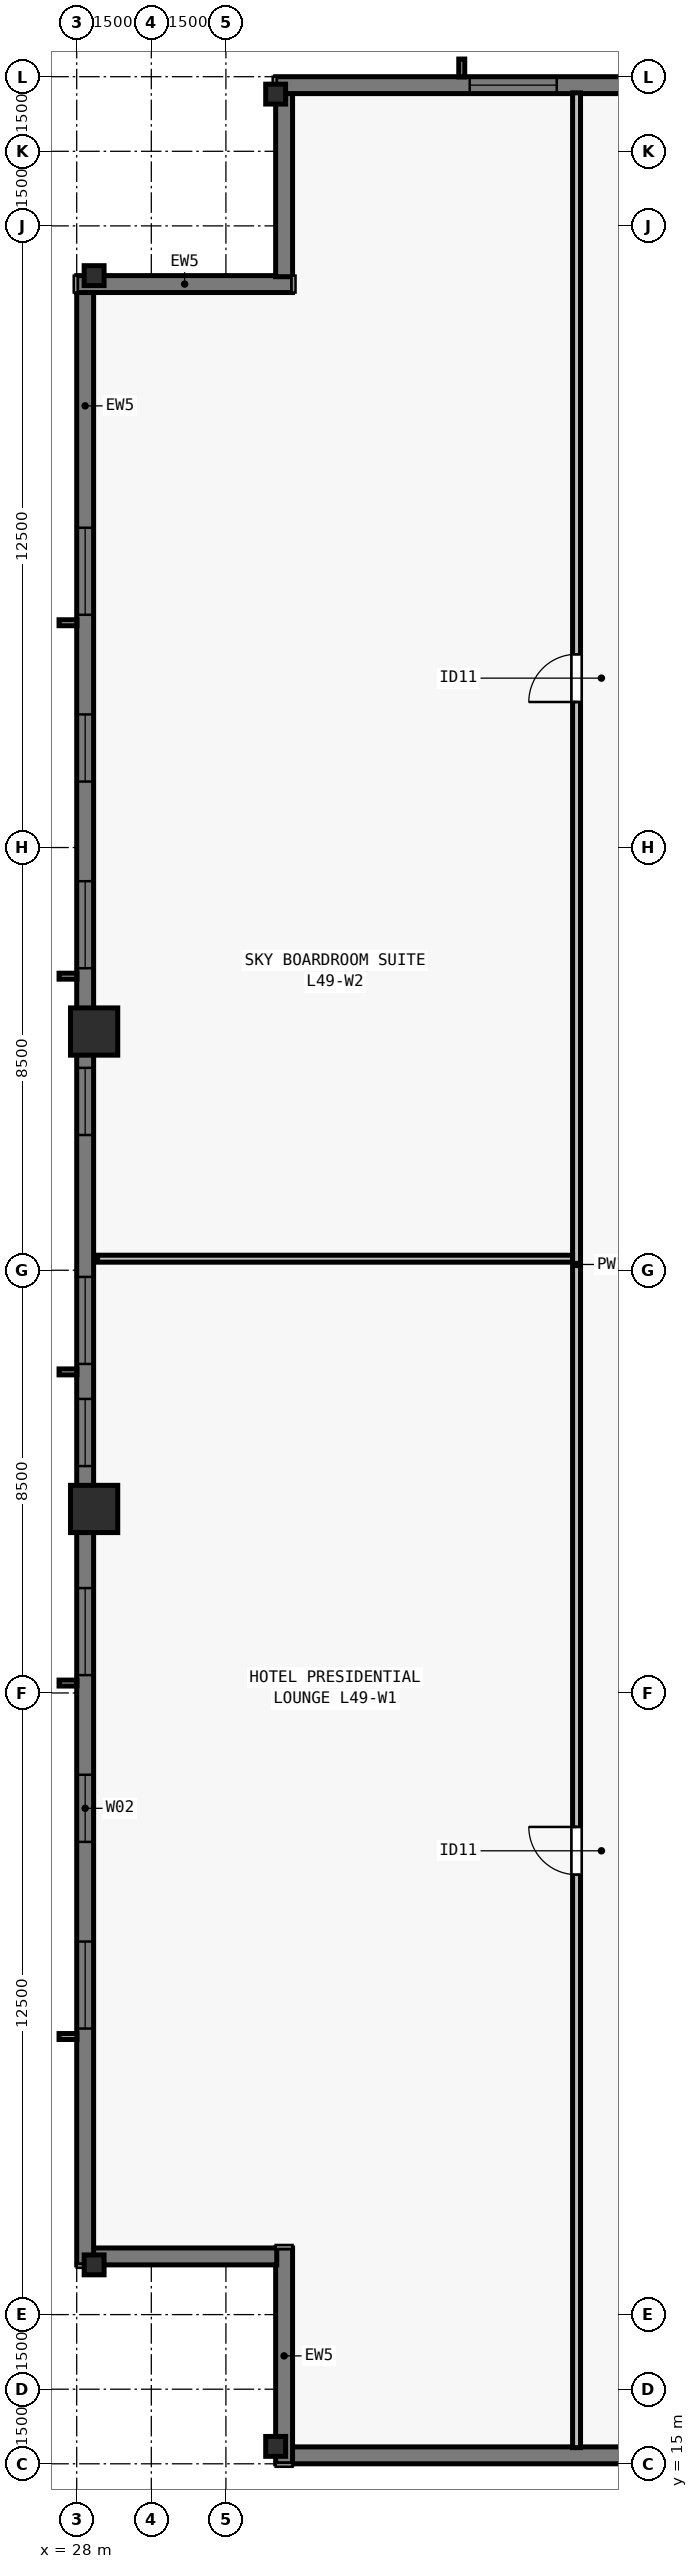
"""IFC4 building model, lengths in metres.
Left out: names, types, materials, properties, quantities, classifications, styles, units other than length and angle.
Written with IfcOpenShell. Run it as: python <this file> out.ifc"""

import sys

from ifc_helpers import new_model, si_unit, direction, frame, frame_2d, origin, origin_2d, place, context, subcontext, project, spatial, rectangle, i_section, extrude, element, fill, save


model = new_model("IFC4")
c1 = context("Model", 3, precision=1e-05, world=origin(), true_north=direction((0.0, 1.0)))
c2 = subcontext(c1, "Body", "Model", "MODEL_VIEW")
j1 = project(units=[si_unit("LENGTHUNIT", "METRE"), si_unit("PLANEANGLEUNIT", "RADIAN")], contexts=[c1])
p1 = place(None, origin())
s1 = spatial("IfcSite", under=j1, at=p1, CompositionType="ELEMENT")
p2 = place(p1, origin())
s2 = spatial("IfcBuilding", under=s1, at=p2, CompositionType="ELEMENT")
p3 = place(p2, frame((0.0, 0.0, 179.5)))
s3 = spatial("IfcBuildingStorey", under=s2, at=p3, CompositionType="ELEMENT", Elevation=179.5)
for number, where, z_axis, x_axis in (
    (1, (32.0, 15.35, 0.0), (0.0, 0.0, 1.0), (1.0, 0.0, 0.0)),
    (2, (32.0, 62.65, 0.0), (0.0, 0.0, 1.0), (1.0, 0.0, 0.0)),
    (3, (28.35, 59.0, 0.0), (0.0, 0.0, 1.0), (0.0, 1.0, 0.0)),
):
    element("IfcColumn", number, at=place(p3, frame(where, z_axis=z_axis, x_axis=x_axis)), inside=s3, PredefinedType="COLUMN", context=c2, shape_type="SweptSolid", body=[
        extrude(i_section(OverallWidth=0.4, OverallDepth=0.4, WebThickness=0.022, FlangeThickness=0.036, at=origin_2d()), origin(), (0.0, 0.0, 1.0), 3.5),
    ])
for number, where, z_axis, x_axis in (
    (4, (28.35, 43.8, 0.0), (0.0, 0.0, 1.0), (0.0, 1.0, 0.0)),
    (5, (28.35, 34.2, 0.0), (0.0, 0.0, 1.0), (0.0, 1.0, 0.0)),
):
    element("IfcColumn", number, at=place(p3, frame(where, z_axis=z_axis, x_axis=x_axis)), inside=s3, PredefinedType="COLUMN", context=c2, shape_type="SweptSolid", body=[
        extrude(rectangle(XDim=0.95, YDim=0.95, at=origin_2d()), origin(), (0.0, 0.0, 1.0), 3.5),
    ])
p4 = place(p3, frame((28.35, 19.0, 0.0), z_axis=(0.0, 0.0, 1.0), x_axis=(0.0, 1.0, 0.0)))
e6 = element("IfcColumn", 6, at=p4, inside=s3, PredefinedType="COLUMN", context=c2, shape_type="SweptSolid", body=[
    extrude(i_section(OverallWidth=0.4, OverallDepth=0.4, WebThickness=0.022, FlangeThickness=0.036, at=origin_2d()), origin(), (0.0, 0.0, 1.0), 3.5),
])
p5 = place(p3, frame((72.0, 15.17, 0.0), z_axis=(0.0, 0.0, 1.0), x_axis=(-1.0, 0.0, 0.0)))
e7 = element("IfcWall", 7, at=p5, inside=s3, PredefinedType="SOLIDWALL", context=c2, shape_type="SweptSolid", body=[
    extrude(rectangle(XDim=39.682, YDim=0.34, at=frame_2d((19.841, 0.0))), origin(), (0.0, 0.0, 1.0), 3.28),
])
p6 = place(p5, frame((11.859, 0.0, 0.8)))
e8 = element("IfcOpeningElement", 8, at=p6, cuts=e7, PredefinedType="OPENING", context=c2, shape_type="SweptSolid", body=[
    extrude(rectangle(XDim=1.75, YDim=1.66, at=frame_2d((0.875, 0.83))), frame((0.0, 0.18, 0.0), z_axis=(0.0, -1.0, 0.0), x_axis=(1.0, 0.0, 0.0)), (0.0, 0.0, 1.0), 0.36),
])
p7 = place(p5, frame((18.966, 0.0, 0.8)))
e9 = element("IfcOpeningElement", 9, at=p7, cuts=e7, PredefinedType="OPENING", context=c2, shape_type="SweptSolid", body=[
    extrude(rectangle(XDim=1.75, YDim=1.66, at=frame_2d((0.875, 0.83))), frame((0.0, 0.18, 0.0), z_axis=(0.0, -1.0, 0.0), x_axis=(1.0, 0.0, 0.0)), (0.0, 0.0, 1.0), 0.36),
])
p8 = place(p5, frame((22.27, 0.0, 0.8)))
e10 = element("IfcOpeningElement", 10, at=p8, cuts=e7, PredefinedType="OPENING", context=c2, shape_type="SweptSolid", body=[
    extrude(rectangle(XDim=1.35, YDim=1.66, at=frame_2d((0.675, 0.83))), frame((0.0, 0.18, 0.0), z_axis=(0.0, -1.0, 0.0), x_axis=(1.0, 0.0, 0.0)), (0.0, 0.0, 1.0), 0.36),
])
p9 = place(p5, frame((26.073, 0.0, 0.8)))
e11 = element("IfcOpeningElement", 11, at=p9, cuts=e7, PredefinedType="OPENING", context=c2, shape_type="SweptSolid", body=[
    extrude(rectangle(XDim=1.75, YDim=1.66, at=frame_2d((0.875, 0.83))), frame((0.0, 0.18, 0.0), z_axis=(0.0, -1.0, 0.0), x_axis=(1.0, 0.0, 0.0)), (0.0, 0.0, 1.0), 0.36),
])
p10 = place(p5, frame((29.827, 0.0, 0.8)))
e12 = element("IfcOpeningElement", 12, at=p10, cuts=e7, PredefinedType="OPENING", context=c2, shape_type="SweptSolid", body=[
    extrude(rectangle(XDim=1.35, YDim=1.66, at=frame_2d((0.675, 0.83))), frame((0.0, 0.18, 0.0), z_axis=(0.0, -1.0, 0.0), x_axis=(1.0, 0.0, 0.0)), (0.0, 0.0, 1.0), 0.36),
])
p11 = place(p3, frame((32.17, 15.0, 0.0), z_axis=(0.0, 0.0, 1.0), x_axis=(0.0, 1.0, 0.0)))
e13 = element("IfcWall", 13, at=p11, inside=s3, PredefinedType="SOLIDWALL", context=c2, shape_type="SweptSolid", body=[
    extrude(rectangle(XDim=4.34, YDim=0.34, at=frame_2d((2.17, 0.0))), origin(), (0.0, 0.0, 1.0), 3.28),
])
p12 = place(p3, frame((32.022, 19.17, 0.0), z_axis=(0.0, 0.0, 1.0), x_axis=(-1.0, 0.0, 0.0)))
e14 = element("IfcWall", 14, at=p12, inside=s3, PredefinedType="SOLIDWALL", context=c2, shape_type="SweptSolid", body=[
    extrude(rectangle(XDim=3.704, YDim=0.34, at=frame_2d((1.852, 0.0))), origin(), (0.0, 0.0, 1.0), 3.28),
])
p13 = place(p3, frame((28.17, 19.0, 0.0), z_axis=(0.0, 0.0, 1.0), x_axis=(0.0, 1.0, 0.0)))
e15 = element("IfcWall", 15, at=p13, inside=s3, PredefinedType="SOLIDWALL", context=c2, shape_type="SweptSolid", body=[
    extrude(rectangle(XDim=39.682, YDim=0.34, at=frame_2d((19.841, 0.0))), origin(), (0.0, 0.0, 1.0), 3.28),
])
p14 = place(p13, frame((4.752, 0.0, 0.8)))
e16 = element("IfcOpeningElement", 16, at=p14, cuts=e15, PredefinedType="OPENING", context=c2, shape_type="SweptSolid", body=[
    extrude(rectangle(XDim=1.75, YDim=1.66, at=frame_2d((0.875, 0.83))), frame((0.0, 0.18, 0.0), z_axis=(0.0, -1.0, 0.0), x_axis=(1.0, 0.0, 0.0)), (0.0, 0.0, 1.0), 0.36),
])
p15 = place(p13, frame((8.505, 0.0, 0.8)))
e17 = element("IfcOpeningElement", 17, at=p15, cuts=e15, PredefinedType="OPENING", context=c2, shape_type="SweptSolid", body=[
    extrude(rectangle(XDim=1.35, YDim=1.66, at=frame_2d((0.675, 0.83))), frame((0.0, 0.18, 0.0), z_axis=(0.0, -1.0, 0.0), x_axis=(1.0, 0.0, 0.0)), (0.0, 0.0, 1.0), 0.36),
])
p16 = place(p13, frame((11.859, 0.0, 0.8)))
e18 = element("IfcOpeningElement", 18, at=p16, cuts=e15, PredefinedType="OPENING", context=c2, shape_type="SweptSolid", body=[
    extrude(rectangle(XDim=1.75, YDim=1.66, at=frame_2d((0.875, 0.83))), frame((0.0, 0.18, 0.0), z_axis=(0.0, -1.0, 0.0), x_axis=(1.0, 0.0, 0.0)), (0.0, 0.0, 1.0), 0.36),
])
p17 = place(p13, frame((16.062, 0.0, 0.8)))
e19 = element("IfcOpeningElement", 19, at=p17, cuts=e15, PredefinedType="OPENING", context=c2, shape_type="SweptSolid", body=[
    extrude(rectangle(XDim=1.35, YDim=1.66, at=frame_2d((0.675, 0.83))), frame((0.0, 0.18, 0.0), z_axis=(0.0, -1.0, 0.0), x_axis=(1.0, 0.0, 0.0)), (0.0, 0.0, 1.0), 0.36),
])
p18 = place(p13, frame((18.116, 0.0, 0.8)))
e20 = element("IfcOpeningElement", 20, at=p18, cuts=e15, PredefinedType="OPENING", context=c2, shape_type="SweptSolid", body=[
    extrude(rectangle(XDim=1.75, YDim=1.66, at=frame_2d((0.875, 0.83))), frame((0.0, 0.18, 0.0), z_axis=(0.0, -1.0, 0.0), x_axis=(1.0, 0.0, 0.0)), (0.0, 0.0, 1.0), 0.36),
])
p19 = place(p13, frame((22.719, 0.0, 0.8)))
e21 = element("IfcOpeningElement", 21, at=p19, cuts=e15, PredefinedType="OPENING", context=c2, shape_type="SweptSolid", body=[
    extrude(rectangle(XDim=1.35, YDim=1.66, at=frame_2d((0.675, 0.83))), frame((0.0, 0.18, 0.0), z_axis=(0.0, -1.0, 0.0), x_axis=(1.0, 0.0, 0.0)), (0.0, 0.0, 1.0), 0.36),
])
p20 = place(p13, frame((26.073, 0.0, 0.8)))
e22 = element("IfcOpeningElement", 22, at=p20, cuts=e15, PredefinedType="OPENING", context=c2, shape_type="SweptSolid", body=[
    extrude(rectangle(XDim=1.75, YDim=1.66, at=frame_2d((0.875, 0.83))), frame((0.0, 0.18, 0.0), z_axis=(0.0, -1.0, 0.0), x_axis=(1.0, 0.0, 0.0)), (0.0, 0.0, 1.0), 0.36),
])
p21 = place(p13, frame((29.827, 0.0, 0.8)))
e23 = element("IfcOpeningElement", 23, at=p21, cuts=e15, PredefinedType="OPENING", context=c2, shape_type="SweptSolid", body=[
    extrude(rectangle(XDim=1.35, YDim=1.66, at=frame_2d((0.675, 0.83))), frame((0.0, 0.18, 0.0), z_axis=(0.0, -1.0, 0.0), x_axis=(1.0, 0.0, 0.0)), (0.0, 0.0, 1.0), 0.36),
])
p22 = place(p13, frame((33.18, 0.0, 0.8)))
e24 = element("IfcOpeningElement", 24, at=p22, cuts=e15, PredefinedType="OPENING", context=c2, shape_type="SweptSolid", body=[
    extrude(rectangle(XDim=1.75, YDim=1.66, at=frame_2d((0.875, 0.83))), frame((0.0, 0.18, 0.0), z_axis=(0.0, -1.0, 0.0), x_axis=(1.0, 0.0, 0.0)), (0.0, 0.0, 1.0), 0.36),
])
p23 = place(p3, frame((28.0, 58.83, 0.0), z_axis=(0.0, 0.0, 1.0), x_axis=(1.0, 0.0, 0.0)))
e25 = element("IfcWall", 25, at=p23, inside=s3, PredefinedType="SOLIDWALL", context=c2, shape_type="SweptSolid", body=[
    extrude(rectangle(XDim=4.34, YDim=0.34, at=frame_2d((2.17, 0.0))), origin(), (0.0, 0.0, 1.0), 3.28),
])
p24 = place(p3, frame((32.17, 58.978, 0.0), z_axis=(0.0, 0.0, 1.0), x_axis=(0.0, 1.0, 0.0)))
e26 = element("IfcWall", 26, at=p24, inside=s3, PredefinedType="SOLIDWALL", context=c2, shape_type="SweptSolid", body=[
    extrude(rectangle(XDim=3.704, YDim=0.34, at=frame_2d((1.852, 0.0))), origin(), (0.0, 0.0, 1.0), 3.28),
])
p25 = place(p3, frame((32.0, 62.83, 0.0), z_axis=(0.0, 0.0, 1.0), x_axis=(1.0, 0.0, 0.0)))
e27 = element("IfcWall", 27, at=p25, inside=s3, PredefinedType="SOLIDWALL", context=c2, shape_type="SweptSolid", body=[
    extrude(rectangle(XDim=39.682, YDim=0.34, at=frame_2d((19.841, 0.0))), origin(), (0.0, 0.0, 1.0), 3.28),
])
p26 = place(p25, frame((3.902, 0.0, 0.8)))
e28 = element("IfcOpeningElement", 28, at=p26, cuts=e27, PredefinedType="OPENING", context=c2, shape_type="SweptSolid", body=[
    extrude(rectangle(XDim=1.75, YDim=1.66, at=frame_2d((0.875, 0.83))), frame((0.0, 0.18, 0.0), z_axis=(0.0, -1.0, 0.0), x_axis=(1.0, 0.0, 0.0)), (0.0, 0.0, 1.0), 0.36),
])
p27 = place(p25, frame((8.505, 0.0, 0.8)))
e29 = element("IfcOpeningElement", 29, at=p27, cuts=e27, PredefinedType="OPENING", context=c2, shape_type="SweptSolid", body=[
    extrude(rectangle(XDim=1.35, YDim=1.66, at=frame_2d((0.675, 0.83))), frame((0.0, 0.18, 0.0), z_axis=(0.0, -1.0, 0.0), x_axis=(1.0, 0.0, 0.0)), (0.0, 0.0, 1.0), 0.36),
])
p28 = place(p25, frame((11.859, 0.0, 0.8)))
e30 = element("IfcOpeningElement", 30, at=p28, cuts=e27, PredefinedType="OPENING", context=c2, shape_type="SweptSolid", body=[
    extrude(rectangle(XDim=1.75, YDim=1.66, at=frame_2d((0.875, 0.83))), frame((0.0, 0.18, 0.0), z_axis=(0.0, -1.0, 0.0), x_axis=(1.0, 0.0, 0.0)), (0.0, 0.0, 1.0), 0.36),
])
p29 = place(p25, frame((16.062, 0.0, 0.8)))
e31 = element("IfcOpeningElement", 31, at=p29, cuts=e27, PredefinedType="OPENING", context=c2, shape_type="SweptSolid", body=[
    extrude(rectangle(XDim=1.35, YDim=1.66, at=frame_2d((0.675, 0.83))), frame((0.0, 0.18, 0.0), z_axis=(0.0, -1.0, 0.0), x_axis=(1.0, 0.0, 0.0)), (0.0, 0.0, 1.0), 0.36),
])
p30 = place(p25, frame((17.716, 0.0, 0.8)))
e32 = element("IfcOpeningElement", 32, at=p30, cuts=e27, PredefinedType="OPENING", context=c2, shape_type="SweptSolid", body=[
    extrude(rectangle(XDim=1.75, YDim=1.66, at=frame_2d((0.875, 0.83))), frame((0.0, 0.18, 0.0), z_axis=(0.0, -1.0, 0.0), x_axis=(1.0, 0.0, 0.0)), (0.0, 0.0, 1.0), 0.36),
])
p31 = place(p25, frame((22.719, 0.0, 0.8)))
e33 = element("IfcOpeningElement", 33, at=p31, cuts=e27, PredefinedType="OPENING", context=c2, shape_type="SweptSolid", body=[
    extrude(rectangle(XDim=1.35, YDim=1.66, at=frame_2d((0.675, 0.83))), frame((0.0, 0.18, 0.0), z_axis=(0.0, -1.0, 0.0), x_axis=(1.0, 0.0, 0.0)), (0.0, 0.0, 1.0), 0.36),
])
p32 = place(p25, frame((26.073, 0.0, 0.8)))
e34 = element("IfcOpeningElement", 34, at=p32, cuts=e27, PredefinedType="OPENING", context=c2, shape_type="SweptSolid", body=[
    extrude(rectangle(XDim=1.75, YDim=1.66, at=frame_2d((0.875, 0.83))), frame((0.0, 0.18, 0.0), z_axis=(0.0, -1.0, 0.0), x_axis=(1.0, 0.0, 0.0)), (0.0, 0.0, 1.0), 0.36),
])
p33 = place(p25, frame((30.677, 0.0, 0.8)))
e35 = element("IfcOpeningElement", 35, at=p33, cuts=e27, PredefinedType="OPENING", context=c2, shape_type="SweptSolid", body=[
    extrude(rectangle(XDim=1.35, YDim=1.66, at=frame_2d((0.675, 0.83))), frame((0.0, 0.18, 0.0), z_axis=(0.0, -1.0, 0.0), x_axis=(1.0, 0.0, 0.0)), (0.0, 0.0, 1.0), 0.36),
])
p34 = place(p25, frame((33.18, 0.0, 0.8)))
e36 = element("IfcOpeningElement", 36, at=p34, cuts=e27, PredefinedType="OPENING", context=c2, shape_type="SweptSolid", body=[
    extrude(rectangle(XDim=1.75, YDim=1.66, at=frame_2d((0.875, 0.83))), frame((0.0, 0.18, 0.0), z_axis=(0.0, -1.0, 0.0), x_axis=(1.0, 0.0, 0.0)), (0.0, 0.0, 1.0), 0.36),
])
p35 = place(p3, frame((38.05, 15.325, 0.0), z_axis=(0.0, 0.0, 1.0), x_axis=(0.0, 1.0, 0.0)))
e37 = element("IfcWall", 37, at=p35, inside=s3, PredefinedType="PARTITIONING", context=c2, shape_type="SweptSolid", body=[
    extrude(rectangle(XDim=47.35, YDim=0.16, at=frame_2d((23.675, 0.0))), origin(), (0.0, 0.0, 1.0), 2.555),
])
p36 = place(p35, frame((11.521, 0.0, 0.0)))
e38 = element("IfcOpeningElement", 38, at=p36, cuts=e37, PredefinedType="OPENING", context=c2, shape_type="SweptSolid", body=[
    extrude(rectangle(XDim=0.96, YDim=2.12, at=frame_2d((0.48, 1.06))), frame((0.0, 0.09, 0.0), z_axis=(0.0, -1.0, 0.0), x_axis=(1.0, 0.0, 0.0)), (0.0, 0.0, 1.0), 0.18),
])
p37 = place(p35, frame((35.101, 0.0, 0.0)))
e39 = element("IfcOpeningElement", 39, at=p37, cuts=e37, PredefinedType="OPENING", context=c2, shape_type="SweptSolid", body=[
    extrude(rectangle(XDim=0.96, YDim=2.12, at=frame_2d((0.48, 1.06))), frame((0.0, 0.09, 0.0), z_axis=(0.0, -1.0, 0.0), x_axis=(1.0, 0.0, 0.0)), (0.0, 0.0, 1.0), 0.18),
])
p38 = place(p3, frame((28.42, 39.232, 0.0), z_axis=(0.0, 0.0, 1.0), x_axis=(1.0, 0.0, 0.0)))
e40 = element("IfcWall", 40, at=p38, inside=s3, PredefinedType="PARTITIONING", context=c2, shape_type="SweptSolid", body=[
    extrude(rectangle(XDim=9.55, YDim=0.14, at=frame_2d((4.775, 0.0))), origin(), (0.0, 0.0, 1.0), 2.896),
])
p39 = place(p14, origin())
e41 = element("IfcWindow", 41, at=p39, inside=s3, PartitioningType="SINGLE_PANEL", PredefinedType="WINDOW", context=c2, shape_type="SweptSolid", body=[
    extrude(rectangle(XDim=1.75, YDim=1.66, at=frame_2d((0.875, 0.83))), frame((0.0, -0.05, 0.0), z_axis=(0.0, -1.0, 0.0), x_axis=(1.0, 0.0, 0.0)), (0.0, 0.0, 1.0), 0.06),
])
fill(e16, e41)
p40 = place(p15, origin())
e42 = element("IfcWindow", 42, at=p40, inside=s3, PartitioningType="SINGLE_PANEL", PredefinedType="WINDOW", context=c2, shape_type="SweptSolid", body=[
    extrude(rectangle(XDim=1.35, YDim=1.66, at=frame_2d((0.675, 0.83))), frame((0.0, -0.05, 0.0), z_axis=(0.0, -1.0, 0.0), x_axis=(1.0, 0.0, 0.0)), (0.0, 0.0, 1.0), 0.06),
])
fill(e17, e42)
p41 = place(p16, origin())
e43 = element("IfcWindow", 43, at=p41, inside=s3, PartitioningType="SINGLE_PANEL", PredefinedType="WINDOW", context=c2, shape_type="SweptSolid", body=[
    extrude(rectangle(XDim=1.75, YDim=1.66, at=frame_2d((0.875, 0.83))), frame((0.0, -0.05, 0.0), z_axis=(0.0, -1.0, 0.0), x_axis=(1.0, 0.0, 0.0)), (0.0, 0.0, 1.0), 0.06),
])
fill(e18, e43)
p42 = place(p17, origin())
e44 = element("IfcWindow", 44, at=p42, inside=s3, PartitioningType="SINGLE_PANEL", PredefinedType="WINDOW", context=c2, shape_type="SweptSolid", body=[
    extrude(rectangle(XDim=1.35, YDim=1.66, at=frame_2d((0.675, 0.83))), frame((0.0, -0.05, 0.0), z_axis=(0.0, -1.0, 0.0), x_axis=(1.0, 0.0, 0.0)), (0.0, 0.0, 1.0), 0.06),
])
fill(e19, e44)
p43 = place(p18, origin())
e45 = element("IfcWindow", 45, at=p43, inside=s3, PartitioningType="SINGLE_PANEL", PredefinedType="WINDOW", context=c2, shape_type="SweptSolid", body=[
    extrude(rectangle(XDim=1.75, YDim=1.66, at=frame_2d((0.875, 0.83))), frame((0.0, -0.05, 0.0), z_axis=(0.0, -1.0, 0.0), x_axis=(1.0, 0.0, 0.0)), (0.0, 0.0, 1.0), 0.06),
])
fill(e20, e45)
p44 = place(p19, origin())
e46 = element("IfcWindow", 46, at=p44, inside=s3, PartitioningType="SINGLE_PANEL", PredefinedType="WINDOW", context=c2, shape_type="SweptSolid", body=[
    extrude(rectangle(XDim=1.35, YDim=1.66, at=frame_2d((0.675, 0.83))), frame((0.0, -0.05, 0.0), z_axis=(0.0, -1.0, 0.0), x_axis=(1.0, 0.0, 0.0)), (0.0, 0.0, 1.0), 0.06),
])
fill(e21, e46)
p45 = place(p20, origin())
e47 = element("IfcWindow", 47, at=p45, inside=s3, PartitioningType="SINGLE_PANEL", PredefinedType="WINDOW", context=c2, shape_type="SweptSolid", body=[
    extrude(rectangle(XDim=1.75, YDim=1.66, at=frame_2d((0.875, 0.83))), frame((0.0, -0.05, 0.0), z_axis=(0.0, -1.0, 0.0), x_axis=(1.0, 0.0, 0.0)), (0.0, 0.0, 1.0), 0.06),
])
fill(e22, e47)
p46 = place(p21, origin())
e48 = element("IfcWindow", 48, at=p46, inside=s3, PartitioningType="SINGLE_PANEL", PredefinedType="WINDOW", context=c2, shape_type="SweptSolid", body=[
    extrude(rectangle(XDim=1.35, YDim=1.66, at=frame_2d((0.675, 0.83))), frame((0.0, -0.05, 0.0), z_axis=(0.0, -1.0, 0.0), x_axis=(1.0, 0.0, 0.0)), (0.0, 0.0, 1.0), 0.06),
])
fill(e23, e48)
p47 = place(p22, origin())
e49 = element("IfcWindow", 49, at=p47, inside=s3, PartitioningType="SINGLE_PANEL", PredefinedType="WINDOW", context=c2, shape_type="SweptSolid", body=[
    extrude(rectangle(XDim=1.75, YDim=1.66, at=frame_2d((0.875, 0.83))), frame((0.0, -0.05, 0.0), z_axis=(0.0, -1.0, 0.0), x_axis=(1.0, 0.0, 0.0)), (0.0, 0.0, 1.0), 0.06),
])
fill(e24, e49)
p48 = place(p26, origin())
e50 = element("IfcWindow", 50, at=p48, inside=s3, PartitioningType="SINGLE_PANEL", PredefinedType="WINDOW", context=c2, shape_type="SweptSolid", body=[
    extrude(rectangle(XDim=1.75, YDim=1.66, at=frame_2d((0.875, 0.83))), frame((0.0, -0.05, 0.0), z_axis=(0.0, -1.0, 0.0), x_axis=(1.0, 0.0, 0.0)), (0.0, 0.0, 1.0), 0.06),
])
fill(e28, e50)
p49 = place(p36, origin())
e51 = element("IfcDoor", 51, at=p49, inside=s3, OperationType="SINGLE_SWING_RIGHT", PredefinedType="DOOR", context=c2, shape_type="SweptSolid", body=[
    extrude(rectangle(XDim=0.96, YDim=2.12, at=frame_2d((0.48, 1.06))), frame((0.0, 0.025, 0.0), z_axis=(0.0, -1.0, 0.0), x_axis=(1.0, 0.0, 0.0)), (0.0, 0.0, 1.0), 0.05),
])
fill(e38, e51)
p50 = place(p37, origin())
e52 = element("IfcDoor", 52, at=p50, inside=s3, OperationType="SINGLE_SWING_LEFT", PredefinedType="DOOR", context=c2, shape_type="SweptSolid", body=[
    extrude(rectangle(XDim=0.96, YDim=2.12, at=frame_2d((0.48, 1.06))), frame((0.0, 0.025, 0.0), z_axis=(0.0, -1.0, 0.0), x_axis=(1.0, 0.0, 0.0)), (0.0, 0.0, 1.0), 0.05),
])
fill(e39, e52)
save(model, sys.argv[1])
